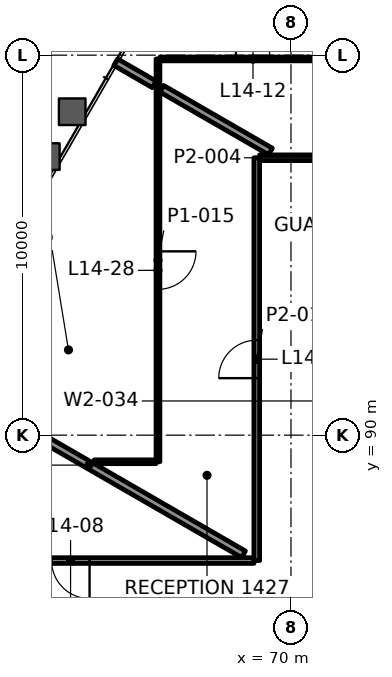
"""IFC4 building model, lengths in metres.
Left out: names, types, materials, properties, quantities, classifications, styles, units other than length and angle.
Written with IfcOpenShell. Run it as: python <this file> out.ifc"""

import sys

from ifc_helpers import new_model, si_unit, direction, frame, frame_2d, origin, place, context, subcontext, project, spatial, rectangle, extrude, element, fill, save


model = new_model("IFC4")
c1 = context("Model", 3, precision=1e-05, world=origin(), true_north=direction((0.0, 1.0)))
c2 = subcontext(c1, "Body", "Model", "MODEL_VIEW")
j1 = project(units=[si_unit("LENGTHUNIT", "METRE"), si_unit("PLANEANGLEUNIT", "RADIAN")], contexts=[c1])
p1 = place(None, origin())
s1 = spatial("IfcSite", under=j1, at=p1, CompositionType="ELEMENT")
p2 = place(p1, origin())
s2 = spatial("IfcBuilding", under=s1, at=p2, CompositionType="ELEMENT")
p3 = place(p2, frame((0.0, 0.0, 65.2)))
s3 = spatial("IfcBuildingStorey", under=s2, at=p3, CompositionType="ELEMENT", Elevation=65.2)
p4 = place(p3, frame((69.025, 86.7, 0.0), z_axis=(0.0, 0.0, 1.0), x_axis=(-1.0, 0.0, 0.0)))
e1 = element("IfcWall", 1, at=p4, inside=s3, PredefinedType="PARTITIONING", context=c2, shape_type="SweptSolid", body=[
    extrude(rectangle(XDim=9.649, YDim=0.15, at=frame_2d((4.825, 0.0))), origin(), (0.0, 0.0, 1.0), 3.4),
])
p5 = place(p4, frame((4.325, 0.0, 0.0)))
e2 = element("IfcOpeningElement", 2, at=p5, cuts=e1, PredefinedType="OPENING", context=c2, shape_type="SweptSolid", body=[
    extrude(rectangle(XDim=1.0, YDim=2.1, at=frame_2d((0.5, 1.05))), frame((0.0, 0.085, 0.0), z_axis=(0.0, -1.0, 0.0), x_axis=(1.0, 0.0, 0.0)), (0.0, 0.0, 1.0), 0.17),
])
p6 = place(p3, frame((64.823, 89.3, 0.0), z_axis=(0.0, 0.0, 1.0), x_axis=(1.0, 0.0, 0.0)))
e3 = element("IfcWall", 3, at=p6, inside=s3, PredefinedType="PARTITIONING", context=c2, shape_type="SweptSolid", body=[
    extrude(rectangle(XDim=1.627, YDim=0.1, at=frame_2d((0.813, 0.0))), origin(), (0.0, 0.0, 1.0), 3.4),
])
p7 = place(p3, frame((69.175, 97.3, 0.0), z_axis=(0.0, 0.0, 1.0), x_axis=(1.0, 0.0, 0.0)))
e4 = element("IfcWall", 4, at=p7, inside=s3, PredefinedType="PARTITIONING", context=c2, shape_type="SweptSolid", body=[
    extrude(rectangle(XDim=4.85, YDim=0.15, at=frame_2d((2.425, 0.0))), origin(), (0.0, 0.0, 1.0), 3.4),
])
p8 = place(p7, frame((2.107, 0.0, 0.0)))
e5 = element("IfcOpeningElement", 5, at=p8, cuts=e4, PredefinedType="OPENING", context=c2, shape_type="SweptSolid", body=[
    extrude(rectangle(XDim=1.0, YDim=2.1, at=frame_2d((0.5, 1.05))), frame((0.0, 0.085, 0.0), z_axis=(0.0, -1.0, 0.0), x_axis=(1.0, 0.0, 0.0)), (0.0, 0.0, 1.0), 0.17),
])
p9 = place(p3, frame((66.551, 99.9, 0.0), z_axis=(0.0, 0.0, 1.0), x_axis=(1.0, 0.0, 0.0)))
e6 = element("IfcWall", 6, at=p9, inside=s3, PredefinedType="PARTITIONING", context=c2, shape_type="SweptSolid", body=[
    extrude(rectangle(XDim=4.899, YDim=0.1, at=frame_2d((2.45, 0.0))), origin(), (0.0, 0.0, 1.0), 3.165),
])
p10 = place(p9, frame((2.0, 0.0, 0.0)))
e7 = element("IfcOpeningElement", 7, at=p10, cuts=e6, PredefinedType="OPENING", context=c2, shape_type="SweptSolid", body=[
    extrude(rectangle(XDim=0.9, YDim=2.1, at=frame_2d((0.45, 1.05))), frame((0.0, 0.06, 0.0), z_axis=(0.0, -1.0, 0.0), x_axis=(1.0, 0.0, 0.0)), (0.0, 0.0, 1.0), 0.12),
])
p11 = place(p3, frame((69.1, 86.7, 0.0), z_axis=(0.0, 0.0, 1.0), x_axis=(0.0, 1.0, 0.0)))
e8 = element("IfcWall", 8, at=p11, inside=s3, PredefinedType="PARTITIONING", context=c2, shape_type="SweptSolid", body=[
    extrude(rectangle(XDim=10.6, YDim=0.15, at=frame_2d((5.3, 0.0))), origin(), (0.0, 0.0, 1.0), 3.4),
])
p12 = place(p11, frame((4.8, 0.0, 0.0)))
e9 = element("IfcOpeningElement", 9, at=p12, cuts=e8, PredefinedType="OPENING", context=c2, shape_type="SweptSolid", body=[
    extrude(rectangle(XDim=1.0, YDim=2.1, at=frame_2d((0.5, 1.05))), frame((0.0, 0.085, 0.0), z_axis=(0.0, -1.0, 0.0), x_axis=(1.0, 0.0, 0.0)), (0.0, 0.0, 1.0), 0.17),
])
p13 = place(p3, frame((66.5, 99.899, 0.0), z_axis=(0.0, 0.0, 1.0), x_axis=(0.0, -1.0, 0.0)))
e10 = element("IfcWall", 10, at=p13, inside=s3, PredefinedType="PARTITIONING", context=c2, shape_type="SweptSolid", body=[
    extrude(rectangle(XDim=10.599, YDim=0.1, at=frame_2d((5.3, 0.0))), origin(), (0.0, 0.0, 1.0), 3.165),
])
p14 = place(p13, frame((5.062, 0.0, 0.0)))
e11 = element("IfcOpeningElement", 11, at=p14, cuts=e10, PredefinedType="OPENING", context=c2, shape_type="SweptSolid", body=[
    extrude(rectangle(XDim=1.0, YDim=2.1, at=frame_2d((0.5, 1.05))), frame((0.0, 0.06, 0.0), z_axis=(0.0, -1.0, 0.0), x_axis=(1.0, 0.0, 0.0)), (0.0, 0.0, 1.0), 0.12),
])
p15 = place(p3, frame((69.46, 97.465, 0.0), z_axis=(0.0, 0.0, 1.0), x_axis=(-0.866027998537, 0.499995505729, 0.0)))
e12 = element("IfcWall", 12, at=p15, inside=s3, PredefinedType="PARTITIONING", context=c2, shape_type="SweptSolid", body=[
    extrude(rectangle(XDim=3.302, YDim=0.2, at=frame_2d((1.651, 0.0))), origin(), (0.0, 0.0, 1.0), 3.4),
])
p16 = place(p3, frame((68.751, 86.865, 0.0), z_axis=(0.0, 0.0, 1.0), x_axis=(-0.8660257632, 0.499999377474, 0.0)))
e13 = element("IfcWall", 13, at=p16, inside=s3, PredefinedType="PARTITIONING", context=c2, shape_type="SweptSolid", body=[
    extrude(rectangle(XDim=9.387, YDim=0.2, at=frame_2d((4.693, 0.0))), origin(), (0.0, 0.0, 1.0), 3.165),
])
p17 = place(p3, frame((66.4, 99.231, 0.0), z_axis=(0.0, 0.0, 1.0), x_axis=(-0.86600796803, 0.500030198396, 0.0)))
e14 = element("IfcWall", 14, at=p17, inside=s3, PredefinedType="PARTITIONING", context=c2, shape_type="SweptSolid", body=[
    extrude(rectangle(XDim=1.167, YDim=0.2, at=frame_2d((0.584, 0.0))), origin(), (0.0, 0.0, 1.0), 3.165),
])
p18 = place(p5, origin())
e15 = element("IfcDoor", 15, at=p18, inside=s3, OperationType="SINGLE_SWING_LEFT", PredefinedType="DOOR", context=c2, shape_type="SweptSolid", body=[
    extrude(rectangle(XDim=1.0, YDim=2.1, at=frame_2d((0.5, 1.05))), frame((0.0, 0.025, 0.0), z_axis=(0.0, -1.0, 0.0), x_axis=(1.0, 0.0, 0.0)), (0.0, 0.0, 1.0), 0.05),
])
fill(e2, e15)
p19 = place(p10, origin())
e16 = element("IfcDoor", 16, at=p19, inside=s3, OperationType="SINGLE_SWING_RIGHT", PredefinedType="DOOR", context=c2, shape_type="SweptSolid", body=[
    extrude(rectangle(XDim=0.9, YDim=2.1, at=frame_2d((0.45, 1.05))), frame((0.0, 0.025, 0.0), z_axis=(0.0, -1.0, 0.0), x_axis=(1.0, 0.0, 0.0)), (0.0, 0.0, 1.0), 0.05),
])
fill(e7, e16)
p20 = place(p12, origin())
e17 = element("IfcDoor", 17, at=p20, inside=s3, OperationType="SINGLE_SWING_RIGHT", PredefinedType="DOOR", context=c2, shape_type="SweptSolid", body=[
    extrude(rectangle(XDim=1.0, YDim=2.1, at=frame_2d((0.5, 1.05))), frame((0.0, 0.025, 0.0), z_axis=(0.0, -1.0, 0.0), x_axis=(1.0, 0.0, 0.0)), (0.0, 0.0, 1.0), 0.05),
])
fill(e9, e17)
p21 = place(p14, origin())
e18 = element("IfcDoor", 18, at=p21, inside=s3, OperationType="SINGLE_SWING_RIGHT", PredefinedType="DOOR", context=c2, shape_type="SweptSolid", body=[
    extrude(rectangle(XDim=1.0, YDim=2.1, at=frame_2d((0.5, 1.05))), frame((0.0, 0.025, 0.0), z_axis=(0.0, -1.0, 0.0), x_axis=(1.0, 0.0, 0.0)), (0.0, 0.0, 1.0), 0.05),
])
fill(e11, e18)
save(model, sys.argv[1])
